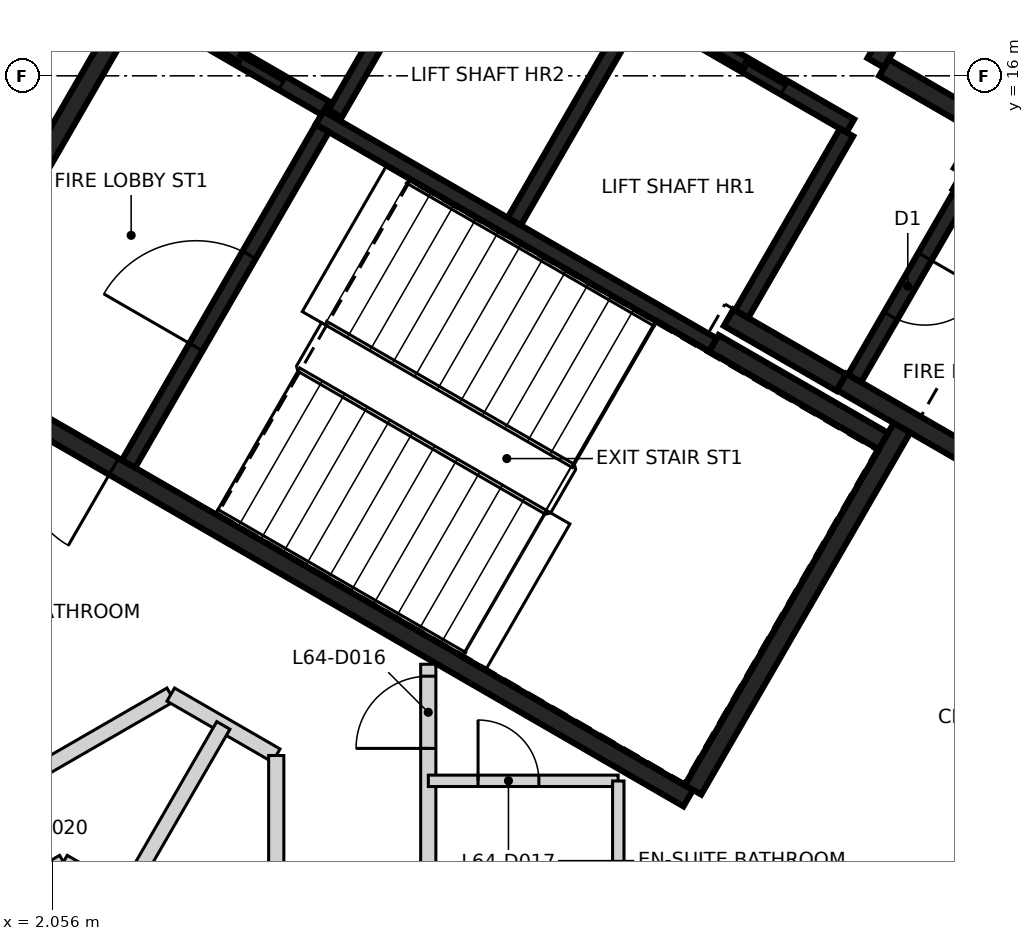
"""IFC4 building model, lengths in metres.
Left out: names, types, materials, properties, quantities, classifications, styles, units other than length and angle.
Written with IfcOpenShell. Run it as: python <this file> out.ifc"""

import sys

from ifc_helpers import new_model, si_unit, direction, frame, frame_2d, origin, place, context, subcontext, project, spatial, rectangle, extrude, element, fill, save


model = new_model("IFC4")
c1 = context("Model", 3, precision=1e-05, world=origin(), true_north=direction((0.0, 1.0)))
c2 = subcontext(c1, "Body", "Model", "MODEL_VIEW")
j1 = project(units=[si_unit("LENGTHUNIT", "METRE"), si_unit("PLANEANGLEUNIT", "RADIAN")], contexts=[c1])
p1 = place(None, origin())
s1 = spatial("IfcSite", under=j1, at=p1, CompositionType="ELEMENT")
p2 = place(p1, origin())
s2 = spatial("IfcBuilding", under=s1, at=p2, CompositionType="ELEMENT")
p3 = place(p2, frame((0.0, 0.0, 253.8)))
s3 = spatial("IfcBuildingStorey", under=s2, at=p3, CompositionType="ELEMENT", Elevation=253.8)
p4 = place(p3, frame((10.42, 6.498, 0.0), z_axis=(0.0, 0.0, 1.0), x_axis=(-0.866021906294, 0.500006057782, 0.0)))
e1 = element("IfcWall", 1, at=p4, inside=s3, PredefinedType="SHEAR", context=c2, shape_type="SweptSolid", body=[
    extrude(rectangle(XDim=11.55, YDim=0.25, at=frame_2d((5.775, 0.0))), origin(), (0.0, 0.0, 1.0), 3.2),
])
p5 = place(p4, frame((10.025, 0.0, 0.0)))
e2 = element("IfcOpeningElement", 2, at=p5, cuts=e1, PredefinedType="OPENING", context=c2, shape_type="SweptSolid", body=[
    extrude(rectangle(XDim=1.2, YDim=2.1, at=frame_2d((0.6, 1.05))), frame((0.0, 0.135, 0.0), z_axis=(0.0, -1.0, 0.0), x_axis=(1.0, 0.0, 0.0)), (0.0, 0.0, 1.0), 0.27),
])
p6 = place(p4, frame((8.725, 0.0, 0.0)))
e3 = element("IfcOpeningElement", 3, at=p6, cuts=e1, PredefinedType="OPENING", context=c2, shape_type="SweptSolid", body=[
    extrude(rectangle(XDim=1.2, YDim=2.1, at=frame_2d((0.6, 1.05))), frame((0.0, 0.135, 0.0), z_axis=(0.0, -1.0, 0.0), x_axis=(1.0, 0.0, 0.0)), (0.0, 0.0, 1.0), 0.27),
])
p7 = place(p3, frame((0.48, 12.381, 0.0), z_axis=(0.0, 0.0, 1.0), x_axis=(0.49999885962, 0.866026062182, 0.0)))
e4 = element("IfcWall", 4, at=p7, inside=s3, PredefinedType="SHEAR", context=c2, shape_type="SweptSolid", body=[
    extrude(rectangle(XDim=5.225, YDim=0.25, at=frame_2d((2.612, 0.0))), origin(), (0.0, 0.0, 1.0), 3.2),
])
p8 = place(p3, frame((13.238, 11.378, 0.0), z_axis=(0.0, 0.0, 1.0), x_axis=(-0.500008851346, -0.866020293397, 0.0)))
e5 = element("IfcWall", 5, at=p8, inside=s3, PredefinedType="SHEAR", context=c2, shape_type="SweptSolid", body=[
    extrude(rectangle(XDim=5.51, YDim=0.25, at=frame_2d((2.755, 0.0))), origin(), (0.0, 0.0, 1.0), 3.2),
])
p9 = place(p3, frame((14.918, 10.54, 0.0), z_axis=(0.0, 0.0, 1.0), x_axis=(-0.866063538972, 0.499933942099, 0.0)))
e6 = element("IfcWall", 6, at=p9, inside=s3, PredefinedType="SHEAR", context=c2, shape_type="SweptSolid", body=[
    extrude(rectangle(XDim=2.865, YDim=0.25, at=frame_2d((1.432, 0.0))), origin(), (0.0, 0.0, 1.0), 3.2),
])
p10 = place(p3, frame((13.963, 14.614, 0.0), z_axis=(0.0, 0.0, 1.0), x_axis=(0.866042235819, -0.499970844928, 0.0)))
e7 = element("IfcWall", 7, at=p10, inside=s3, PredefinedType="SHEAR", context=c2, shape_type="SweptSolid", body=[
    extrude(rectangle(XDim=2.865, YDim=0.25, at=frame_2d((1.432, 0.0))), origin(), (0.0, 0.0, 1.0), 3.2),
])
p11 = place(p3, frame((10.757, 12.481, 0.0), z_axis=(0.0, 0.0, 1.0), x_axis=(0.866022940537, -0.500004266446, 0.0)))
e8 = element("IfcWall", 8, at=p11, inside=s3, PredefinedType="SHEAR", context=c2, shape_type="SweptSolid", body=[
    extrude(rectangle(XDim=2.575, YDim=0.25, at=frame_2d((1.287, 0.0))), origin(), (0.0, 0.0, 1.0), 3.2),
])
p12 = place(p3, frame((13.819, 17.785, 0.0), z_axis=(0.0, 0.0, 1.0), x_axis=(-0.500039802285, -0.866002422705, 0.0)))
e9 = element("IfcWall", 9, at=p12, inside=s3, PredefinedType="SHEAR", context=c2, shape_type="SweptSolid", body=[
    extrude(rectangle(XDim=1.865, YDim=0.25, at=frame_2d((0.932, 0.0))), origin(), (0.0, 0.0, 1.0), 3.2),
])
p13 = place(p3, frame((12.433, 11.964, 0.0), z_axis=(0.0, 0.0, 1.0), x_axis=(-0.866038183914, 0.499977863513, 0.0)))
e10 = element("IfcWall", 10, at=p13, inside=s3, PredefinedType="SHEAR", context=c2, shape_type="SweptSolid", body=[
    extrude(rectangle(XDim=1.71, YDim=0.25, at=frame_2d((0.855, 0.0))), origin(), (0.0, 0.0, 1.0), 3.2),
])
p14 = place(p3, frame((12.995, 16.108, 0.0), z_axis=(0.0, 0.0, 1.0), x_axis=(0.866044474677, -0.49996696679, 0.0)))
e11 = element("IfcWall", 11, at=p14, inside=s3, PredefinedType="SHEAR", context=c2, shape_type="SweptSolid", body=[
    extrude(rectangle(XDim=1.584, YDim=0.25, at=frame_2d((0.792, 0.0))), origin(), (0.0, 0.0, 1.0), 3.2),
])
p15 = place(p3, frame((14.305, 15.207, 0.0), z_axis=(0.0, 0.0, 1.0), x_axis=(-0.499848422343, -0.866112899501, 0.0)))
e12 = element("IfcWall", 12, at=p15, inside=s3, PredefinedType="SHEAR", context=c2, shape_type="SweptSolid", body=[
    extrude(rectangle(XDim=0.559, YDim=0.25, at=frame_2d((0.28, 0.0))), origin(), (0.0, 0.0, 1.0), 3.2),
])
p16 = place(p3, frame((12.552, 15.342, 0.0), z_axis=(0.0, 0.0, 1.0), x_axis=(-0.866030299012, 0.499991521122, 0.0)))
e13 = element("IfcWall", 13, at=p16, inside=s3, PredefinedType="SHEAR", context=c2, shape_type="SweptSolid", body=[
    extrude(rectangle(XDim=6.1, YDim=0.2, at=frame_2d((3.05, 0.0))), origin(), (0.0, 0.0, 1.0), 3.2),
])
p17 = place(p16, frame((1.0, 0.0, 0.0)))
e14 = element("IfcOpeningElement", 14, at=p17, cuts=e13, PredefinedType="OPENING", context=c2, shape_type="SweptSolid", body=[
    extrude(rectangle(XDim=1.2, YDim=2.1, at=frame_2d((0.6, 1.05))), frame((0.0, 0.11, 0.0), z_axis=(0.0, -1.0, 0.0), x_axis=(1.0, 0.0, 0.0)), (0.0, 0.0, 1.0), 0.22),
])
p18 = place(p16, frame((3.982, 0.0, 0.0)))
e15 = element("IfcOpeningElement", 15, at=p18, cuts=e13, PredefinedType="OPENING", context=c2, shape_type="SweptSolid", body=[
    extrude(rectangle(XDim=1.2, YDim=2.1, at=frame_2d((0.6, 1.05))), frame((0.0, 0.11, 0.0), z_axis=(0.0, -1.0, 0.0), x_axis=(1.0, 0.0, 0.0)), (0.0, 0.0, 1.0), 0.22),
])
p19 = place(p3, frame((10.743, 12.46, 0.0), z_axis=(0.0, 0.0, 1.0), x_axis=(-0.866018848283, 0.500011354289, 0.0)))
e16 = element("IfcWall", 16, at=p19, inside=s3, PredefinedType="SHEAR", context=c2, shape_type="SweptSolid", body=[
    extrude(rectangle(XDim=5.974, YDim=0.2, at=frame_2d((2.987, 0.0))), origin(), (0.0, 0.0, 1.0), 3.2),
])
p20 = place(p3, frame((3.057, 10.895, 0.0), z_axis=(0.0, 0.0, 1.0), x_axis=(0.500027839223, 0.866009330205, 0.0)))
e17 = element("IfcWall", 17, at=p20, inside=s3, PredefinedType="SHEAR", context=c2, shape_type="SweptSolid", body=[
    extrude(rectangle(XDim=5.098, YDim=0.2, at=frame_2d((2.549, 0.0))), origin(), (0.0, 0.0, 1.0), 3.2),
])
p21 = place(p20, frame((1.774, 0.0, 0.0)))
e18 = element("IfcOpeningElement", 18, at=p21, cuts=e17, PredefinedType="OPENING", context=c2, shape_type="SweptSolid", body=[
    extrude(rectangle(XDim=1.4, YDim=2.1, at=frame_2d((0.7, 1.05))), frame((0.0, 0.11, 0.0), z_axis=(0.0, -1.0, 0.0), x_axis=(1.0, 0.0, 0.0)), (0.0, 0.0, 1.0), 0.22),
])
p22 = place(p3, frame((8.132, 14.084, 0.0), z_axis=(0.0, 0.0, 1.0), x_axis=(0.500030834389, 0.86600760081, 0.0)))
e19 = element("IfcWall", 19, at=p22, inside=s3, PredefinedType="SHEAR", context=c2, shape_type="SweptSolid", body=[
    extrude(rectangle(XDim=3.198, YDim=0.2, at=frame_2d((1.599, 0.0))), origin(), (0.0, 0.0, 1.0), 3.2),
])
p23 = place(p3, frame((14.008, 14.442, 0.0), z_axis=(0.0, 0.0, 1.0), x_axis=(-0.499986818241, -0.866033014143, 0.0)))
e20 = element("IfcWall", 20, at=p23, inside=s3, PredefinedType="SHEAR", context=c2, shape_type="SweptSolid", body=[
    extrude(rectangle(XDim=2.798, YDim=0.2, at=frame_2d((1.399, 0.0))), origin(), (0.0, 0.0, 1.0), 3.2),
])
p24 = place(p23, frame((0.949, 0.0, 0.0)))
e21 = element("IfcOpeningElement", 21, at=p24, cuts=e20, PredefinedType="OPENING", context=c2, shape_type="SweptSolid", body=[
    extrude(rectangle(XDim=0.9, YDim=2.1, at=frame_2d((0.45, 1.05))), frame((0.0, 0.11, 0.0), z_axis=(0.0, -1.0, 0.0), x_axis=(1.0, 0.0, 0.0)), (0.0, 0.0, 1.0), 0.22),
])
p25 = place(p3, frame((12.502, 15.255, 0.0), z_axis=(0.0, 0.0, 1.0), x_axis=(-0.499965018551, -0.866045599391, 0.0)))
e22 = element("IfcWall", 22, at=p25, inside=s3, PredefinedType="SHEAR", context=c2, shape_type="SweptSolid", body=[
    extrude(rectangle(XDim=2.759, YDim=0.2, at=frame_2d((1.379, 0.0))), origin(), (0.0, 0.0, 1.0), 3.2),
])
p26 = place(p3, frame((7.324, 18.187, 0.0), z_axis=(0.0, 0.0, 1.0), x_axis=(-0.499967891604, -0.866043940782, 0.0)))
e23 = element("IfcWall", 23, at=p26, inside=s3, PredefinedType="SHEAR", context=c2, shape_type="SweptSolid", body=[
    extrude(rectangle(XDim=3.1, YDim=0.2, at=frame_2d((1.55, 0.0))), origin(), (0.0, 0.0, 1.0), 3.2),
])
p27 = place(p3, frame((5.646, 15.576, 0.0), z_axis=(0.0, 0.0, 1.0), x_axis=(-0.866018407898, 0.500012117035, 0.0)))
e24 = element("IfcWall", 24, at=p27, inside=s3, PredefinedType="SHEAR", context=c2, shape_type="SweptSolid", body=[
    extrude(rectangle(XDim=2.651, YDim=0.2, at=frame_2d((1.325, 0.0))), origin(), (0.0, 0.0, 1.0), 3.2),
])
p28 = place(p27, frame((0.652, 0.0, 0.0)))
e25 = element("IfcOpeningElement", 25, at=p28, cuts=e24, PredefinedType="OPENING", context=c2, shape_type="SweptSolid", body=[
    extrude(rectangle(XDim=1.3, YDim=2.1, at=frame_2d((0.65, 1.05))), frame((0.0, 0.11, 0.0), z_axis=(0.0, -1.0, 0.0), x_axis=(1.0, 0.0, 0.0)), (0.0, 0.0, 1.0), 0.22),
])
p29 = place(p3, frame((-8.612, 0.801, 0.0), z_axis=(0.0, 0.0, 1.0), x_axis=(0.866005560651, 0.500034367741, 0.0)))
e26 = element("IfcWall", 26, at=p29, inside=s3, PredefinedType="PARTITIONING", context=c2, shape_type="SweptSolid", body=[
    extrude(rectangle(XDim=14.115, YDim=0.2, at=frame_2d((7.058, 0.0))), origin(), (0.0, 0.0, 1.0), 3.2),
])
p30 = place(p29, frame((10.131, 0.0, 0.0)))
e27 = element("IfcOpeningElement", 27, at=p30, cuts=e26, PredefinedType="OPENING", context=c2, shape_type="SweptSolid", body=[
    extrude(rectangle(XDim=0.9, YDim=2.1, at=frame_2d((0.45, 1.05))), frame((0.0, 0.11, 0.0), z_axis=(0.0, -1.0, 0.0), x_axis=(1.0, 0.0, 0.0)), (0.0, 0.0, 1.0), 0.22),
])
p31 = place(p29, frame((3.085, 0.0, 0.0)))
e28 = element("IfcOpeningElement", 28, at=p31, cuts=e26, PredefinedType="OPENING", context=c2, shape_type="SweptSolid", body=[
    extrude(rectangle(XDim=0.9, YDim=2.1, at=frame_2d((0.45, 1.05))), frame((0.0, 0.11, 0.0), z_axis=(0.0, -1.0, 0.0), x_axis=(1.0, 0.0, 0.0)), (0.0, 0.0, 1.0), 0.22),
])
p32 = place(p3, frame((-1.037, 12.741, 0.0), z_axis=(0.0, 0.0, 1.0), x_axis=(0.492679417867, 0.870210888929, 0.0)))
e29 = element("IfcWall", 29, at=p32, inside=s3, PredefinedType="PARTITIONING", context=c2, shape_type="SweptSolid", body=[
    extrude(rectangle(XDim=8.636, YDim=0.2, at=frame_2d((4.318, 0.0))), origin(), (0.0, 0.0, 1.0), 3.2),
])
p33 = place(p32, frame((4.438, 0.0, 0.0)))
e30 = element("IfcOpeningElement", 30, at=p33, cuts=e29, PredefinedType="OPENING", context=c2, shape_type="SweptSolid", body=[
    extrude(rectangle(XDim=0.95, YDim=2.1, at=frame_2d((0.475, 1.05))), frame((0.0, 0.11, 0.0), z_axis=(0.0, -1.0, 0.0), x_axis=(1.0, 0.0, 0.0)), (0.0, 0.0, 1.0), 0.22),
])
p34 = place(p3, frame((3.612, 7.859, 0.0), z_axis=(0.0, 0.0, 1.0), x_axis=(0.866002901518, -0.500038973044, 0.0)))
e31 = element("IfcWall", 31, at=p34, inside=s3, PredefinedType="PARTITIONING", context=c2, shape_type="SweptSolid", body=[
    extrude(rectangle(XDim=1.602, YDim=0.2, at=frame_2d((0.801, 0.0))), origin(), (0.0, 0.0, 1.0), 3.2),
])
p35 = place(p3, frame((5.0, -7.058, 0.0), z_axis=(0.0, 0.0, 1.0), x_axis=(0.0, 1.0, 0.0)))
e32 = element("IfcWall", 32, at=p35, inside=s3, PredefinedType="PARTITIONING", context=c2, shape_type="SweptSolid", body=[
    extrude(rectangle(XDim=14.116, YDim=0.2, at=frame_2d((7.058, 0.0))), origin(), (0.0, 0.0, 1.0), 3.2),
])
p36 = place(p35, frame((3.085, 0.0, 0.0)))
e33 = element("IfcOpeningElement", 33, at=p36, cuts=e32, PredefinedType="OPENING", context=c2, shape_type="SweptSolid", body=[
    extrude(rectangle(XDim=0.9, YDim=2.1, at=frame_2d((0.45, 1.05))), frame((0.0, 0.11, 0.0), z_axis=(0.0, -1.0, 0.0), x_axis=(1.0, 0.0, 0.0)), (0.0, 0.0, 1.0), 0.22),
])
p37 = place(p35, frame((10.131, 0.0, 0.0)))
e34 = element("IfcOpeningElement", 34, at=p37, cuts=e32, PredefinedType="OPENING", context=c2, shape_type="SweptSolid", body=[
    extrude(rectangle(XDim=0.9, YDim=2.1, at=frame_2d((0.45, 1.05))), frame((0.0, 0.11, 0.0), z_axis=(0.0, -1.0, 0.0), x_axis=(1.0, 0.0, 0.0)), (0.0, 0.0, 1.0), 0.22),
])
p38 = place(p3, frame((7.0, -4.625, 0.0), z_axis=(0.0, 0.0, 1.0), x_axis=(0.0, 1.0, 0.0)))
e35 = element("IfcWall", 35, at=p38, inside=s3, PredefinedType="PARTITIONING", context=c2, shape_type="SweptSolid", body=[
    extrude(rectangle(XDim=12.884, YDim=0.2, at=frame_2d((6.442, 0.0))), origin(), (0.0, 0.0, 1.0), 3.2),
])
p39 = place(p38, frame((3.931, 0.0, 0.0)))
e36 = element("IfcOpeningElement", 36, at=p39, cuts=e35, PredefinedType="OPENING", context=c2, shape_type="SweptSolid", body=[
    extrude(rectangle(XDim=1.4, YDim=2.1, at=frame_2d((0.7, 1.05))), frame((0.0, 0.11, 0.0), z_axis=(0.0, -1.0, 0.0), x_axis=(1.0, 0.0, 0.0)), (0.0, 0.0, 1.0), 0.22),
])
p40 = place(p38, frame((11.777, 0.0, 0.0)))
e37 = element("IfcOpeningElement", 37, at=p40, cuts=e35, PredefinedType="OPENING", context=c2, shape_type="SweptSolid", body=[
    extrude(rectangle(XDim=0.95, YDim=2.1, at=frame_2d((0.475, 1.05))), frame((0.0, 0.11, 0.0), z_axis=(0.0, -1.0, 0.0), x_axis=(1.0, 0.0, 0.0)), (0.0, 0.0, 1.0), 0.22),
])
p41 = place(p3, frame((-6.0, 0.924, 0.0), z_axis=(0.0, 0.0, 1.0), x_axis=(0.866012967051, 0.500021540435, 0.0)))
e38 = element("IfcWall", 38, at=p41, inside=s3, PredefinedType="PARTITIONING", context=c2, shape_type="SweptSolid", body=[
    extrude(rectangle(XDim=9.468, YDim=0.2, at=frame_2d((4.734, 0.0))), origin(), (0.0, 0.0, 1.0), 3.2),
])
p42 = place(p3, frame((2.2, 5.658, 0.0), z_axis=(0.0, 0.0, 1.0), x_axis=(0.865818011038, -0.500359042851, 0.0)))
e39 = element("IfcWall", 39, at=p42, inside=s3, PredefinedType="PARTITIONING", context=c2, shape_type="SweptSolid", body=[
    extrude(rectangle(XDim=1.848, YDim=0.2, at=frame_2d((0.924, 0.0))), origin(), (0.0, 0.0, 1.0), 3.2),
])
p43 = place(p3, frame((3.0, 5.196, 0.0), z_axis=(0.0, 0.0, 1.0), x_axis=(0.500076354988, 0.865981315724, 0.0)))
e40 = element("IfcWall", 40, at=p43, inside=s3, PredefinedType="PARTITIONING", context=c2, shape_type="SweptSolid", body=[
    extrude(rectangle(XDim=2.607, YDim=0.2, at=frame_2d((1.304, 0.0))), origin(), (0.0, 0.0, 1.0), 3.2),
])
p44 = place(p3, frame((7.001, 6.725, 0.0), z_axis=(0.0, 0.0, 1.0), x_axis=(1.0, 0.0, 0.0)))
e41 = element("IfcWall", 41, at=p44, inside=s3, PredefinedType="PARTITIONING", context=c2, shape_type="SweptSolid", body=[
    extrude(rectangle(XDim=2.497, YDim=0.15, at=frame_2d((1.249, 0.0))), origin(), (0.0, 0.0, 1.0), 3.2),
])
p45 = place(p44, frame((0.654, 0.0, 0.0)))
e42 = element("IfcOpeningElement", 42, at=p45, cuts=e41, PredefinedType="OPENING", context=c2, shape_type="SweptSolid", body=[
    extrude(rectangle(XDim=0.8, YDim=2.1, at=frame_2d((0.4, 1.05))), frame((0.0, 0.085, 0.0), z_axis=(0.0, -1.0, 0.0), x_axis=(1.0, 0.0, 0.0)), (0.0, 0.0, 1.0), 0.17),
])
p46 = place(p3, frame((9.5, 4.626, 0.0), z_axis=(0.0, 0.0, 1.0), x_axis=(0.0, 1.0, 0.0)))
e43 = element("IfcWall", 43, at=p46, inside=s3, PredefinedType="PARTITIONING", context=c2, shape_type="SweptSolid", body=[
    extrude(rectangle(XDim=2.097, YDim=0.15, at=frame_2d((1.048, 0.0))), origin(), (0.0, 0.0, 1.0), 3.2),
])
p47 = place(p28, origin())
e44 = element("IfcDoor", 44, at=p47, inside=s3, OperationType="SLIDING_TO_LEFT", PredefinedType="DOOR", context=c2, shape_type="SweptSolid", body=[
    extrude(rectangle(XDim=1.3, YDim=2.1, at=frame_2d((0.65, 1.05))), frame((0.0, 0.025, 0.0), z_axis=(0.0, -1.0, 0.0), x_axis=(1.0, 0.0, 0.0)), (0.0, 0.0, 1.0), 0.05),
])
fill(e25, e44)
p48 = place(p17, origin())
e45 = element("IfcDoor", 45, at=p48, inside=s3, OperationType="DOUBLE_DOOR_SLIDING", PredefinedType="DOOR", context=c2, shape_type="SweptSolid", body=[
    extrude(rectangle(XDim=1.2, YDim=2.1, at=frame_2d((0.6, 1.05))), frame((0.0, 0.025, 0.0), z_axis=(0.0, -1.0, 0.0), x_axis=(1.0, 0.0, 0.0)), (0.0, 0.0, 1.0), 0.05),
])
fill(e14, e45)
p49 = place(p6, origin())
e46 = element("IfcDoor", 46, at=p49, inside=s3, OperationType="SINGLE_SWING_RIGHT", PredefinedType="DOOR", context=c2, shape_type="SweptSolid", body=[
    extrude(rectangle(XDim=1.2, YDim=2.1, at=frame_2d((0.6, 1.05))), frame((0.0, 0.025, 0.0), z_axis=(0.0, -1.0, 0.0), x_axis=(1.0, 0.0, 0.0)), (0.0, 0.0, 1.0), 0.05),
])
fill(e3, e46)
p50 = place(p21, origin())
e47 = element("IfcDoor", 47, at=p50, inside=s3, OperationType="SINGLE_SWING_LEFT", PredefinedType="DOOR", context=c2, shape_type="SweptSolid", body=[
    extrude(rectangle(XDim=1.4, YDim=2.1, at=frame_2d((0.7, 1.05))), frame((0.0, 0.025, 0.0), z_axis=(0.0, -1.0, 0.0), x_axis=(1.0, 0.0, 0.0)), (0.0, 0.0, 1.0), 0.05),
])
fill(e18, e47)
p51 = place(p24, origin())
e48 = element("IfcDoor", 48, at=p51, inside=s3, OperationType="SINGLE_SWING_RIGHT", PredefinedType="DOOR", context=c2, shape_type="SweptSolid", body=[
    extrude(rectangle(XDim=0.9, YDim=2.1, at=frame_2d((0.45, 1.05))), frame((0.0, 0.025, 0.0), z_axis=(0.0, -1.0, 0.0), x_axis=(1.0, 0.0, 0.0)), (0.0, 0.0, 1.0), 0.05),
])
fill(e21, e48)
p52 = place(p40, frame((0.95, 0.0, 0.0), z_axis=(0.0, 0.0, 1.0), x_axis=(-1.0, 0.0, 0.0)))
e49 = element("IfcDoor", 49, at=p52, inside=s3, OperationType="SINGLE_SWING_LEFT", PredefinedType="DOOR", context=c2, shape_type="SweptSolid", body=[
    extrude(rectangle(XDim=0.95, YDim=2.1, at=frame_2d((0.475, 1.05))), frame((0.0, 0.025, 0.0), z_axis=(0.0, -1.0, 0.0), x_axis=(1.0, 0.0, 0.0)), (0.0, 0.0, 1.0), 0.05),
])
fill(e37, e49)
p53 = place(p45, origin())
e50 = element("IfcDoor", 50, at=p53, inside=s3, OperationType="SINGLE_SWING_LEFT", PredefinedType="DOOR", context=c2, shape_type="SweptSolid", body=[
    extrude(rectangle(XDim=0.8, YDim=2.1, at=frame_2d((0.4, 1.05))), frame((0.0, 0.025, 0.0), z_axis=(0.0, -1.0, 0.0), x_axis=(1.0, 0.0, 0.0)), (0.0, 0.0, 1.0), 0.05),
])
fill(e42, e50)
save(model, sys.argv[1])
